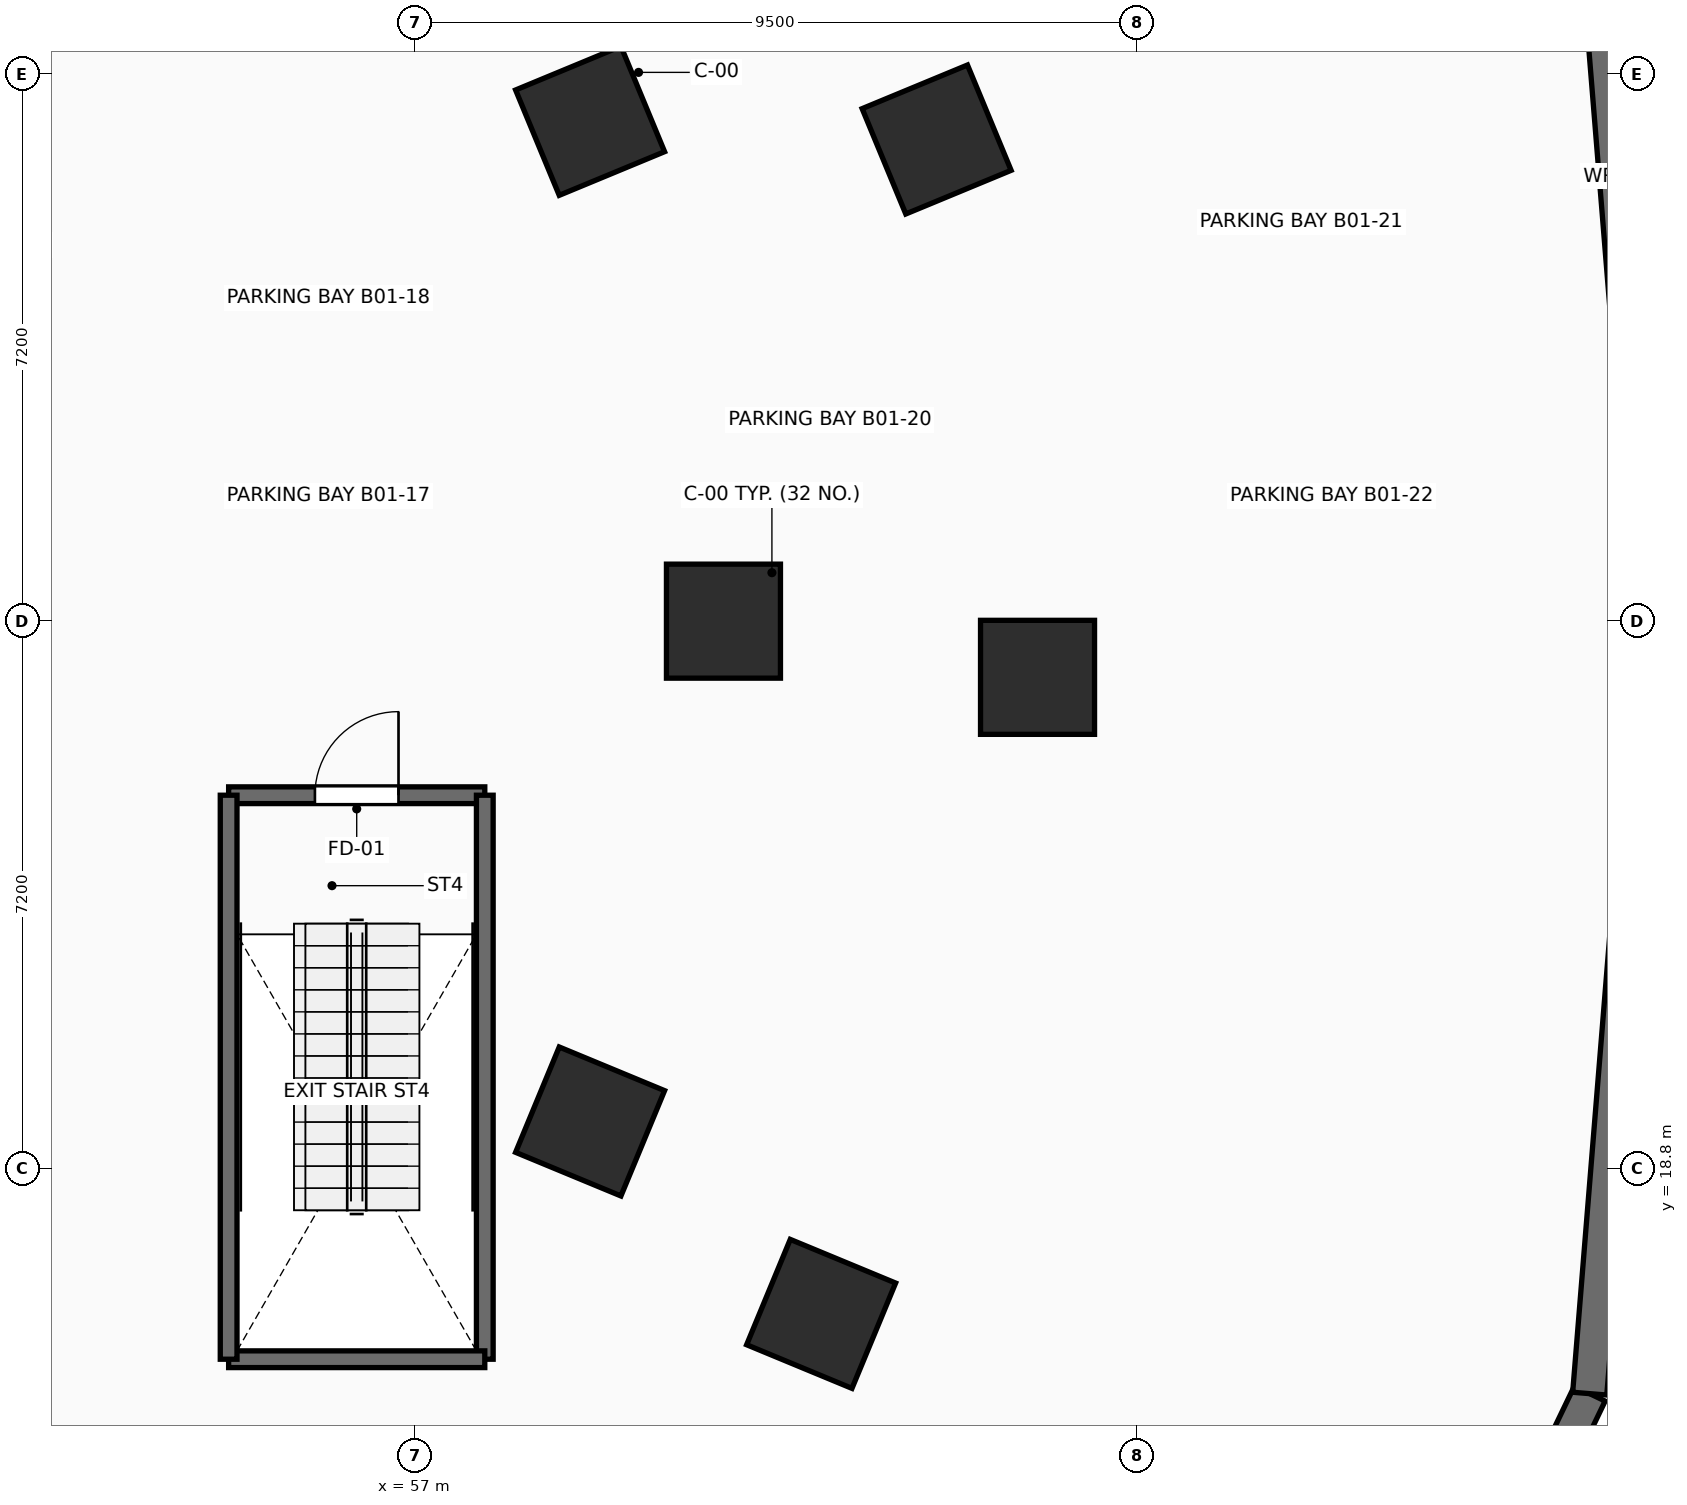
"""IFC4 building model, lengths in metres.
Left out: names, types, materials, properties, quantities, classifications, styles, units other than length and angle.
Written with IfcOpenShell. Run it as: python <this file> out.ifc"""

import sys

from ifc_helpers import new_model, si_unit, direction, frame, frame_2d, origin, origin_2d, place, context, subcontext, project, spatial, rectangle, extrude, element, fill, save


model = new_model("IFC4")
c1 = context("Model", 3, precision=1e-05, world=origin(), true_north=direction((0.0, 1.0)))
c2 = subcontext(c1, "Body", "Model", "MODEL_VIEW")
j1 = project(units=[si_unit("LENGTHUNIT", "METRE"), si_unit("PLANEANGLEUNIT", "RADIAN")], contexts=[c1])
p1 = place(None, origin())
s1 = spatial("IfcSite", under=j1, at=p1, CompositionType="ELEMENT")
p2 = place(p1, origin())
s2 = spatial("IfcBuilding", under=s1, at=p2, CompositionType="ELEMENT")
p3 = place(p2, frame((0.0, 0.0, -4.8)))
s3 = spatial("IfcBuildingStorey", under=s2, at=p3, CompositionType="ELEMENT", Elevation=-4.8)
for number, where, z_axis, x_axis in (
    (1, (61.05, 26.0, 0.0), (0.0, 0.0, 1.0), (1.0, 0.0, 0.0)),
    (2, (59.295, 32.582, 0.0), (0.0, 0.0, 1.0), (0.924, 0.383, 0.0)),
    (3, (59.295, 19.418, 0.0), (0.0, 0.0, 1.0), (0.924, -0.383, 0.0)),
    (4, (65.182, 25.261, 0.0), (0.0, 0.0, 1.0), (1.0, 0.0, 0.0)),
    (5, (63.854, 32.337, 0.0), (0.0, 0.0, 1.0), (0.924, 0.383, 0.0)),
    (6, (62.335, 16.886, 0.0), (0.0, 0.0, 1.0), (0.924, -0.383, 0.0)),
):
    element("IfcColumn", number, at=place(p3, frame(where, z_axis=z_axis, x_axis=x_axis)), inside=s3, PredefinedType="COLUMN", context=c2, shape_type="SweptSolid", body=[
        extrude(rectangle(XDim=1.5, YDim=1.5, at=origin_2d()), origin(), (0.0, 0.0, 1.0), 4.8),
    ])
p4 = place(p3, frame((73.271, 26.0, 0.0), z_axis=(0.0, 0.0, 1.0), x_axis=(-0.080835799126, 0.996727431939, 0.0)))
e7 = element("IfcWall", 7, at=p4, inside=s3, PredefinedType="SOLIDWALL", context=c2, shape_type="SweptSolid", body=[
    extrude(rectangle(XDim=10.196, YDim=0.45, at=frame_2d((5.098, 0.0))), origin(), (0.0, 0.0, 1.0), 4.46),
])
p5 = place(p3, frame((70.0, 10.746, 0.0), z_axis=(0.0, 0.0, 1.0), x_axis=(0.433120243411, 0.901336149695, 0.0)))
e8 = element("IfcWall", 8, at=p5, inside=s3, PredefinedType="SOLIDWALL", context=c2, shape_type="SweptSolid", body=[
    extrude(rectangle(XDim=5.649, YDim=0.45, at=frame_2d((2.824, 0.0))), origin(), (0.0, 0.0, 1.0), 4.46),
])
p6 = place(p3, frame((72.447, 15.837, 0.0), z_axis=(0.0, 0.0, 1.0), x_axis=(0.080835799126, 0.996727431939, 0.0)))
e9 = element("IfcWall", 9, at=p6, inside=s3, PredefinedType="SOLIDWALL", context=c2, shape_type="SweptSolid", body=[
    extrude(rectangle(XDim=10.196, YDim=0.45, at=frame_2d((5.098, 0.0))), origin(), (0.0, 0.0, 1.0), 4.46),
])
p7 = place(p3, frame((54.54, 23.71, 0.0), z_axis=(0.0, 0.0, 1.0), x_axis=(1.0, 0.0, 0.0)))
e10 = element("IfcWall", 10, at=p7, inside=s3, PredefinedType="SOLIDWALL", context=c2, shape_type="SweptSolid", body=[
    extrude(rectangle(XDim=3.37, YDim=0.22, at=frame_2d((1.685, 0.0))), origin(), (0.0, 0.0, 1.0), 4.46),
])
p8 = place(p7, frame((1.135, 0.0, 0.0)))
e11 = element("IfcOpeningElement", 11, at=p8, cuts=e10, PredefinedType="OPENING", context=c2, shape_type="SweptSolid", body=[
    extrude(rectangle(XDim=1.1, YDim=2.15, at=frame_2d((0.55, 1.075))), frame((0.0, 0.125, 0.0), z_axis=(0.0, -1.0, 0.0), x_axis=(1.0, 0.0, 0.0)), (0.0, 0.0, 1.0), 0.25),
])
p9 = place(p3, frame((57.91, 23.71, 0.0), z_axis=(0.0, 0.0, 1.0), x_axis=(0.0, -1.0, 0.0)))
e12 = element("IfcWall", 12, at=p9, inside=s3, PredefinedType="SOLIDWALL", context=c2, shape_type="SweptSolid", body=[
    extrude(rectangle(XDim=7.42, YDim=0.22, at=frame_2d((3.71, 0.0))), origin(), (0.0, 0.0, 1.0), 4.46),
])
p10 = place(p3, frame((57.91, 16.29, 0.0), z_axis=(0.0, 0.0, 1.0), x_axis=(-1.0, 0.0, 0.0)))
e13 = element("IfcWall", 13, at=p10, inside=s3, PredefinedType="SOLIDWALL", context=c2, shape_type="SweptSolid", body=[
    extrude(rectangle(XDim=3.37, YDim=0.22, at=frame_2d((1.685, 0.0))), origin(), (0.0, 0.0, 1.0), 4.46),
])
p11 = place(p3, frame((54.54, 16.29, 0.0), z_axis=(0.0, 0.0, 1.0), x_axis=(0.0, 1.0, 0.0)))
e14 = element("IfcWall", 14, at=p11, inside=s3, PredefinedType="SOLIDWALL", context=c2, shape_type="SweptSolid", body=[
    extrude(rectangle(XDim=7.42, YDim=0.22, at=frame_2d((3.71, 0.0))), origin(), (0.0, 0.0, 1.0), 4.46),
])
p12 = place(p8, origin())
e15 = element("IfcDoor", 15, at=p12, inside=s3, OperationType="SINGLE_SWING_RIGHT", PredefinedType="DOOR", context=c2, shape_type="SweptSolid", body=[
    extrude(rectangle(XDim=1.1, YDim=2.15, at=frame_2d((0.55, 1.075))), frame((0.0, 0.025, 0.0), z_axis=(0.0, -1.0, 0.0), x_axis=(1.0, 0.0, 0.0)), (0.0, 0.0, 1.0), 0.05),
])
fill(e11, e15)
save(model, sys.argv[1])
